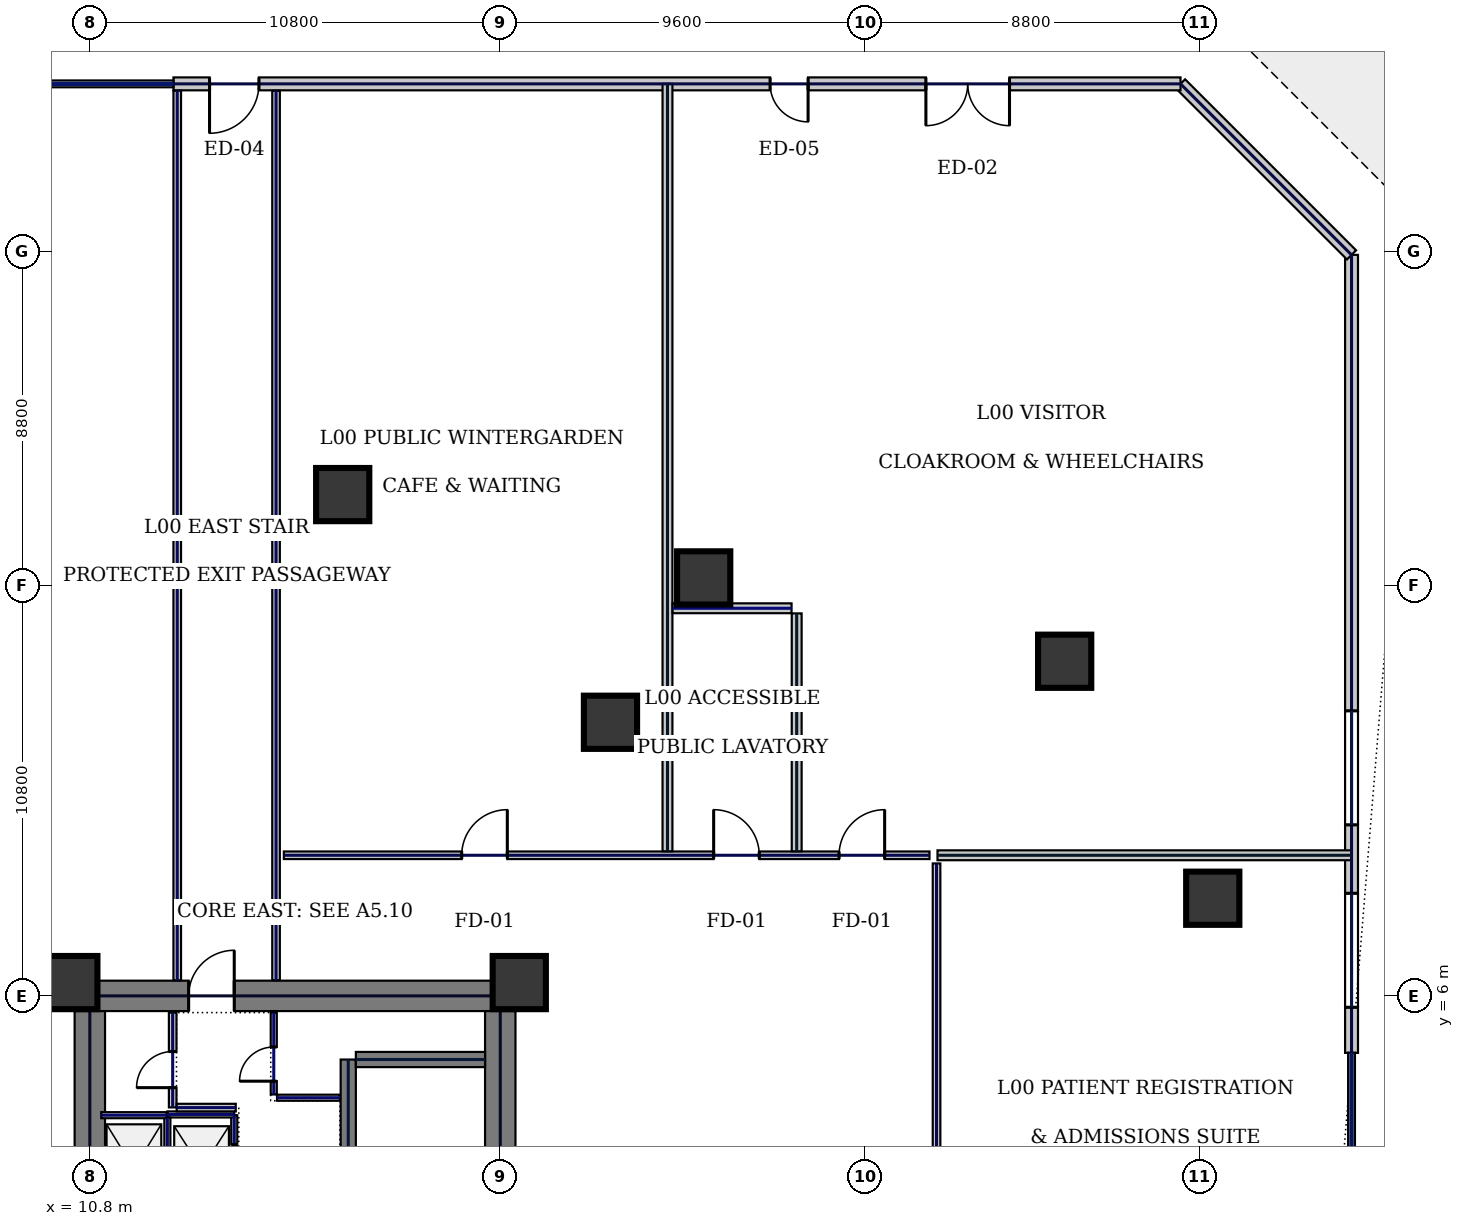
"""IFC4 building model, lengths in metres.
Left out: names, types, materials, properties, quantities, classifications, styles, units other than length and angle.
Written with IfcOpenShell. Run it as: python <this file> out.ifc"""

import sys

from ifc_helpers import new_model, si_unit, direction, frame, frame_2d, origin, origin_2d, place, context, subcontext, project, spatial, rectangle, hollow_circle, extrude, element, fill, save


model = new_model("IFC4")
c1 = context("Model", 3, precision=1e-05, world=origin(), true_north=direction((0.0, 1.0)))
c2 = subcontext(c1, "Body", "Model", "MODEL_VIEW")
j1 = project(units=[si_unit("LENGTHUNIT", "METRE"), si_unit("PLANEANGLEUNIT", "RADIAN")], contexts=[c1])
p1 = place(None, origin())
s1 = spatial("IfcSite", under=j1, at=p1, CompositionType="ELEMENT")
p2 = place(p1, origin())
s2 = spatial("IfcBuilding", under=s1, at=p2, CompositionType="ELEMENT")
p3 = place(p2, origin())
s3 = spatial("IfcBuildingStorey", under=s2, at=p3, CompositionType="ELEMENT", Elevation=0.0)
p4 = place(p3, frame((10.4, 6.0, 0.0), z_axis=(0.0, 0.0, 1.0), x_axis=(1.0, 0.0, 0.0)))
e1 = element("IfcWall", 1, at=p4, inside=s3, PredefinedType="SHEAR", context=c2, shape_type="SweptSolid", body=[
    extrude(rectangle(XDim=11.6, YDim=0.8, at=frame_2d((5.8, 0.0))), origin(), (0.0, 0.0, 1.0), 8.1),
])
p5 = place(p4, frame((3.0, 0.0, 0.0)))
e2 = element("IfcOpeningElement", 2, at=p5, cuts=e1, PredefinedType="OPENING", context=c2, shape_type="SweptSolid", body=[
    extrude(rectangle(XDim=1.2, YDim=2.2, at=frame_2d((0.6, 1.1))), frame((0.0, 0.41, 0.0), z_axis=(0.0, -1.0, 0.0), x_axis=(1.0, 0.0, 0.0)), (0.0, 0.0, 1.0), 0.82),
])
p6 = place(p3, frame((21.6, -5.6, 0.0), z_axis=(0.0, 0.0, 1.0), x_axis=(0.0, 1.0, 0.0)))
e3 = element("IfcWall", 3, at=p6, inside=s3, PredefinedType="SHEAR", context=c2, shape_type="SweptSolid", body=[
    extrude(rectangle(XDim=11.2, YDim=0.8, at=frame_2d((5.6, 0.0))), origin(), (0.0, 0.0, 1.0), 8.1),
])
p7 = place(p3, frame((10.8, 0.05, 0.0), z_axis=(0.0, 0.0, 1.0), x_axis=(0.0, 1.0, 0.0)))
e4 = element("IfcWall", 4, at=p7, inside=s3, PredefinedType="SHEAR", context=c2, shape_type="SweptSolid", body=[
    extrude(rectangle(XDim=5.55, YDim=0.8, at=frame_2d((2.775, 0.0))), origin(), (0.0, 0.0, 1.0), 8.1),
])
p8 = place(p3, frame((17.6, -4.325, 0.0), z_axis=(0.0, 0.0, 1.0), x_axis=(0.0, 1.0, 0.0)))
e5 = element("IfcWall", 5, at=p8, inside=s3, PredefinedType="SHEAR", context=c2, shape_type="SweptSolid", body=[
    extrude(rectangle(XDim=8.65, YDim=0.4, at=frame_2d((4.325, 0.0))), origin(), (0.0, 0.0, 1.0), 8.1),
])
p9 = place(p8, frame((0.25, 0.0, 0.0)))
e6 = element("IfcOpeningElement", 6, at=p9, cuts=e5, PredefinedType="OPENING", context=c2, shape_type="SweptSolid", body=[
    extrude(rectangle(XDim=1.1, YDim=2.2, at=frame_2d((0.55, 1.1))), frame((0.0, 0.21, 0.0), z_axis=(0.0, -1.0, 0.0), x_axis=(1.0, 0.0, 0.0)), (0.0, 0.0, 1.0), 0.42),
])
p10 = place(p3, frame((17.8, 4.325, 0.0), z_axis=(0.0, 0.0, 1.0), x_axis=(1.0, 0.0, 0.0)))
e7 = element("IfcWall", 7, at=p10, inside=s3, PredefinedType="SHEAR", context=c2, shape_type="SweptSolid", body=[
    extrude(rectangle(XDim=3.4, YDim=0.4, at=frame_2d((1.7, 0.0))), origin(), (0.0, 0.0, 1.0), 8.1),
])
for number, where, z_axis, x_axis in (
    (8, (10.3, 6.35, 0.0), (0.0, 0.0, 1.0), (1.0, 0.0, 0.0)),
    (9, (22.1, 6.35, 0.0), (0.0, 0.0, 1.0), (1.0, 0.0, 0.0)),
    (10, (24.5, 13.2, 0.0), (0.0, 0.0, 1.0), (1.0, 0.0, 0.0)),
    (11, (36.451, 14.806, 0.0), (0.0, 0.0, 1.0), (1.0, 0.0, 0.0)),
    (12, (26.952, 16.999, 0.0), (0.0, 0.0, 1.0), (1.0, 0.0, 0.0)),
    (13, (17.454, 19.192, 0.0), (0.0, 0.0, 1.0), (1.0, 0.0, 0.0)),
    (14, (40.348, 8.57, 0.0), (0.0, 0.0, 1.0), (1.0, 0.0, 0.0)),
):
    element("IfcColumn", number, at=place(p3, frame(where, z_axis=z_axis, x_axis=x_axis)), inside=s3, PredefinedType="COLUMN", context=c2, shape_type="SweptSolid", body=[
        extrude(hollow_circle(Radius=0.7, WallThickness=0.05, at=origin_2d()), origin(), (0.0, 0.0, 1.0), 8.1),
    ])
p11 = place(p3, frame((44.0, 4.5, 0.0), z_axis=(0.0, 0.0, 1.0), x_axis=(0.0, 1.0, 0.0)))
e15 = element("IfcWall", 15, at=p11, inside=s3, PredefinedType="STANDARD", context=c2, shape_type="SweptSolid", body=[
    extrude(rectangle(XDim=21.0, YDim=0.34, at=frame_2d((10.5, 0.0))), origin(), (0.0, 0.0, 1.0), 8.1),
])
p12 = place(p11, frame((1.2, 0.0, 1.2)))
e16 = element("IfcOpeningElement", 16, at=p12, cuts=e15, PredefinedType="OPENING", context=c2, shape_type="SweptSolid", body=[
    extrude(rectangle(XDim=3.0, YDim=1.8, at=frame_2d((1.5, 0.9))), frame((0.0, 0.18, 0.0), z_axis=(0.0, -1.0, 0.0), x_axis=(1.0, 0.0, 0.0)), (0.0, 0.0, 1.0), 0.36),
])
p13 = place(p11, frame((6.0, 0.0, 1.2)))
e17 = element("IfcOpeningElement", 17, at=p13, cuts=e15, PredefinedType="OPENING", context=c2, shape_type="SweptSolid", body=[
    extrude(rectangle(XDim=3.0, YDim=1.8, at=frame_2d((1.5, 0.9))), frame((0.0, 0.18, 0.0), z_axis=(0.0, -1.0, 0.0), x_axis=(1.0, 0.0, 0.0)), (0.0, 0.0, 1.0), 0.36),
])
p14 = place(p3, frame((44.0, 25.5, 0.0), z_axis=(0.0, 0.0, 1.0), x_axis=(-0.707106781187, 0.707106781187, 0.0)))
e18 = element("IfcWall", 18, at=p14, inside=s3, PredefinedType="STANDARD", context=c2, shape_type="SweptSolid", body=[
    extrude(rectangle(XDim=6.364, YDim=0.34, at=frame_2d((3.182, 0.0))), origin(), (0.0, 0.0, 1.0), 8.1),
])
p15 = place(p3, frame((39.5, 30.0, 0.0), z_axis=(0.0, 0.0, 1.0), x_axis=(-1.0, 0.0, 0.0)))
e19 = element("IfcWall", 19, at=p15, inside=s3, PredefinedType="STANDARD", context=c2, shape_type="SweptSolid", body=[
    extrude(rectangle(XDim=26.5, YDim=0.34, at=frame_2d((13.25, 0.0))), origin(), (0.0, 0.0, 1.0), 8.1),
])
p16 = place(p15, frame((9.8, 0.0, 0.0)))
e20 = element("IfcOpeningElement", 20, at=p16, cuts=e19, PredefinedType="OPENING", context=c2, shape_type="SweptSolid", body=[
    extrude(rectangle(XDim=1.0, YDim=2.15, at=frame_2d((0.5, 1.075))), frame((0.0, 0.18, 0.0), z_axis=(0.0, -1.0, 0.0), x_axis=(1.0, 0.0, 0.0)), (0.0, 0.0, 1.0), 0.36),
])
p17 = place(p15, frame((4.5, 0.0, 0.0)))
e21 = element("IfcOpeningElement", 21, at=p17, cuts=e19, PredefinedType="OPENING", context=c2, shape_type="SweptSolid", body=[
    extrude(rectangle(XDim=2.2, YDim=2.5, at=frame_2d((1.1, 1.25))), frame((0.0, 0.18, 0.0), z_axis=(0.0, -1.0, 0.0), x_axis=(1.0, 0.0, 0.0)), (0.0, 0.0, 1.0), 0.36),
])
p18 = place(p15, frame((24.25, 0.0, 0.0)))
e22 = element("IfcOpeningElement", 22, at=p18, cuts=e19, PredefinedType="OPENING", context=c2, shape_type="SweptSolid", body=[
    extrude(rectangle(XDim=1.3, YDim=2.2, at=frame_2d((0.65, 1.1))), frame((0.0, 0.18, 0.0), z_axis=(0.0, -1.0, 0.0), x_axis=(1.0, 0.0, 0.0)), (0.0, 0.0, 1.0), 0.36),
])
p19 = place(p3, frame((14.6, 0.12, 0.0), z_axis=(0.0, 0.0, 1.0), x_axis=(0.0, 1.0, 0.0)))
e23 = element("IfcWall", 23, at=p19, inside=s3, PredefinedType="PARTITIONING", context=c2, shape_type="SweptSolid", body=[
    extrude(rectangle(XDim=2.74, YDim=0.16, at=frame_2d((1.37, 0.0))), origin(), (0.0, 0.0, 1.0), 8.1),
])
p20 = place(p19, frame((0.77, 0.0, 0.0)))
e24 = element("IfcOpeningElement", 24, at=p20, cuts=e23, PredefinedType="OPENING", context=c2, shape_type="SweptSolid", body=[
    extrude(rectangle(XDim=1.2, YDim=2.2, at=frame_2d((0.6, 1.1))), frame((0.0, 0.09, 0.0), z_axis=(0.0, -1.0, 0.0), x_axis=(1.0, 0.0, 0.0)), (0.0, 0.0, 1.0), 0.18),
])
p21 = place(p3, frame((12.84, 2.88, 0.0), z_axis=(0.0, 0.0, 1.0), x_axis=(1.0, 0.0, 0.0)))
e25 = element("IfcWall", 25, at=p21, inside=s3, PredefinedType="PARTITIONING", context=c2, shape_type="SweptSolid", body=[
    extrude(rectangle(XDim=1.76, YDim=0.16, at=frame_2d((0.88, 0.0))), origin(), (0.0, 0.0, 1.0), 8.1),
])
p22 = place(p3, frame((12.84, 0.18, 0.0), z_axis=(0.0, 0.0, 1.0), x_axis=(0.0, 1.0, 0.0)))
e26 = element("IfcWall", 26, at=p22, inside=s3, PredefinedType="PARTITIONING", context=c2, shape_type="SweptSolid", body=[
    extrude(rectangle(XDim=2.62, YDim=0.16, at=frame_2d((1.31, 0.0))), origin(), (0.0, 0.0, 1.0), 8.1),
])
p23 = place(p3, frame((11.1, 2.86, 0.0), z_axis=(0.0, 0.0, 1.0), x_axis=(1.0, 0.0, 0.0)))
e27 = element("IfcWall", 27, at=p23, inside=s3, PredefinedType="PARTITIONING", context=c2, shape_type="SweptSolid", body=[
    extrude(rectangle(XDim=1.72, YDim=0.16, at=frame_2d((0.86, 0.0))), origin(), (0.0, 0.0, 1.0), 8.1),
])
p24 = place(p3, frame((15.64, 3.405, 0.0), z_axis=(0.0, 0.0, 1.0), x_axis=(0.0, 1.0, 0.0)))
e28 = element("IfcWall", 28, at=p24, inside=s3, PredefinedType="PARTITIONING", context=c2, shape_type="SweptSolid", body=[
    extrude(rectangle(XDim=2.155, YDim=0.16, at=frame_2d((1.078, 0.0))), origin(), (0.0, 0.0, 1.0), 8.1),
])
p25 = place(p24, frame((0.35, 0.0, 0.0)))
e29 = element("IfcOpeningElement", 29, at=p25, cuts=e28, PredefinedType="OPENING", context=c2, shape_type="SweptSolid", body=[
    extrude(rectangle(XDim=0.9, YDim=2.2, at=frame_2d((0.45, 1.1))), frame((0.0, 0.09, 0.0), z_axis=(0.0, -1.0, 0.0), x_axis=(1.0, 0.0, 0.0)), (0.0, 0.0, 1.0), 0.18),
])
p26 = place(p3, frame((15.725, 3.32, 0.0), z_axis=(0.0, 0.0, 1.0), x_axis=(1.0, 0.0, 0.0)))
e30 = element("IfcWall", 30, at=p26, inside=s3, PredefinedType="PARTITIONING", context=c2, shape_type="SweptSolid", body=[
    extrude(rectangle(XDim=1.655, YDim=0.16, at=frame_2d((0.827, 0.0))), origin(), (0.0, 0.0, 1.0), 8.1),
])
p27 = place(p3, frame((12.98, 3.065, 0.0), z_axis=(0.0, 0.0, 1.0), x_axis=(0.0, 1.0, 0.0)))
e31 = element("IfcWall", 31, at=p27, inside=s3, PredefinedType="SOLIDWALL", context=c2, shape_type="SweptSolid", body=[
    extrude(rectangle(XDim=2.495, YDim=0.2, at=frame_2d((1.248, 0.0))), origin(), (0.0, 0.0, 1.0), 8.1),
])
p28 = place(p27, frame((0.52, 0.0, 0.0)))
e32 = element("IfcOpeningElement", 32, at=p28, cuts=e31, PredefinedType="OPENING", context=c2, shape_type="SweptSolid", body=[
    extrude(rectangle(XDim=0.95, YDim=2.2, at=frame_2d((0.475, 1.1))), frame((0.0, 0.11, 0.0), z_axis=(0.0, -1.0, 0.0), x_axis=(1.0, 0.0, 0.0)), (0.0, 0.0, 1.0), 0.22),
])
p29 = place(p3, frame((13.085, 3.06, 0.0), z_axis=(0.0, 0.0, 1.0), x_axis=(1.0, 0.0, 0.0)))
e33 = element("IfcWall", 33, at=p29, inside=s3, PredefinedType="SOLIDWALL", context=c2, shape_type="SweptSolid", body=[
    extrude(rectangle(XDim=1.555, YDim=0.2, at=frame_2d((0.777, 0.0))), origin(), (0.0, 0.0, 1.0), 8.1),
])
for number, where, z_axis, x_axis in (
    (34, (13.1, 6.41, 0.0), (0.0, 0.0, 1.0), (0.0, 1.0, 0.0)),
    (35, (15.7, 6.41, 0.0), (0.0, 0.0, 1.0), (0.0, 1.0, 0.0)),
):
    element("IfcWall", number, at=place(p3, frame(where, z_axis=z_axis, x_axis=x_axis)), inside=s3, PredefinedType="SOLIDWALL", context=c2, shape_type="SweptSolid", body=[
        extrude(rectangle(XDim=23.41, YDim=0.2, at=frame_2d((11.705, 0.0))), origin(), (0.0, 0.0, 1.0), 8.1),
    ])
p30 = place(p3, frame((15.905, 9.7, 0.0), z_axis=(0.0, 0.0, 1.0), x_axis=(1.0, 0.0, 0.0)))
e36 = element("IfcWall", 36, at=p30, inside=s3, PredefinedType="SOLIDWALL", context=c2, shape_type="SweptSolid", body=[
    extrude(rectangle(XDim=16.99, YDim=0.2, at=frame_2d((8.495, 0.0))), origin(), (0.0, 0.0, 1.0), 8.1),
])
p31 = place(p30, frame((4.681, 0.0, 0.0)))
e37 = element("IfcOpeningElement", 37, at=p31, cuts=e36, PredefinedType="OPENING", context=c2, shape_type="SweptSolid", body=[
    extrude(rectangle(XDim=1.2, YDim=2.2, at=frame_2d((0.6, 1.1))), frame((0.0, 0.11, 0.0), z_axis=(0.0, -1.0, 0.0), x_axis=(1.0, 0.0, 0.0)), (0.0, 0.0, 1.0), 0.22),
])
p32 = place(p30, frame((11.31, 0.0, 0.0)))
e38 = element("IfcOpeningElement", 38, at=p32, cuts=e36, PredefinedType="OPENING", context=c2, shape_type="SweptSolid", body=[
    extrude(rectangle(XDim=1.2, YDim=2.2, at=frame_2d((0.6, 1.1))), frame((0.0, 0.11, 0.0), z_axis=(0.0, -1.0, 0.0), x_axis=(1.0, 0.0, 0.0)), (0.0, 0.0, 1.0), 0.22),
])
p33 = place(p30, frame((14.609, 0.0, 0.0)))
e39 = element("IfcOpeningElement", 39, at=p33, cuts=e36, PredefinedType="OPENING", context=c2, shape_type="SweptSolid", body=[
    extrude(rectangle(XDim=1.2, YDim=2.2, at=frame_2d((0.6, 1.1))), frame((0.0, 0.11, 0.0), z_axis=(0.0, -1.0, 0.0), x_axis=(1.0, 0.0, 0.0)), (0.0, 0.0, 1.0), 0.22),
])
p34 = place(p3, frame((33.08, 9.485, 0.0), z_axis=(0.0, 0.0, 1.0), x_axis=(0.0, -1.0, 0.0)))
e40 = element("IfcWall", 40, at=p34, inside=s3, PredefinedType="SOLIDWALL", context=c2, shape_type="SweptSolid", body=[
    extrude(rectangle(XDim=18.97, YDim=0.2, at=frame_2d((9.485, 0.0))), origin(), (0.0, 0.0, 1.0), 8.1),
])
p35 = place(p34, frame((9.02, 0.0, 0.0)))
e41 = element("IfcOpeningElement", 41, at=p35, cuts=e40, PredefinedType="OPENING", context=c2, shape_type="SweptSolid", body=[
    extrude(rectangle(XDim=1.2, YDim=2.2, at=frame_2d((0.6, 1.1))), frame((0.0, 0.11, 0.0), z_axis=(0.0, -1.0, 0.0), x_axis=(1.0, 0.0, 0.0)), (0.0, 0.0, 1.0), 0.22),
])
p36 = place(p3, frame((33.105, 9.7, 0.0), z_axis=(0.0, 0.0, 1.0), x_axis=(1.0, 0.0, 0.0)))
e42 = element("IfcWall", 42, at=p36, inside=s3, PredefinedType="SOLIDWALL", context=c2, shape_type="SweptSolid", body=[
    extrude(rectangle(XDim=10.895, YDim=0.26, at=frame_2d((5.448, 0.0))), origin(), (0.0, 0.0, 1.0), 8.1),
])
p37 = place(p3, frame((26.0, 9.805, 0.0), z_axis=(0.0, 0.0, 1.0), x_axis=(0.0, 1.0, 0.0)))
e43 = element("IfcWall", 43, at=p37, inside=s3, PredefinedType="SOLIDWALL", context=c2, shape_type="SweptSolid", body=[
    extrude(rectangle(XDim=20.195, YDim=0.26, at=frame_2d((10.098, 0.0))), origin(), (0.0, 0.0, 1.0), 8.1),
])
p38 = place(p3, frame((29.4, 9.805, 0.0), z_axis=(0.0, 0.0, 1.0), x_axis=(0.0, 1.0, 0.0)))
e44 = element("IfcWall", 44, at=p38, inside=s3, PredefinedType="SOLIDWALL", context=c2, shape_type="SweptSolid", body=[
    extrude(rectangle(XDim=6.26, YDim=0.26, at=frame_2d((3.13, 0.0))), origin(), (0.0, 0.0, 1.0), 8.1),
])
p39 = place(p3, frame((26.135, 16.2, 0.0), z_axis=(0.0, 0.0, 1.0), x_axis=(1.0, 0.0, 0.0)))
e45 = element("IfcWall", 45, at=p39, inside=s3, PredefinedType="SOLIDWALL", context=c2, shape_type="SweptSolid", body=[
    extrude(rectangle(XDim=3.13, YDim=0.26, at=frame_2d((1.565, 0.0))), origin(), (0.0, 0.0, 1.0), 7.095),
])
p40 = place(p12, origin())
e46 = element("IfcWindow", 46, at=p40, inside=s3, PartitioningType="SINGLE_PANEL", PredefinedType="WINDOW", context=c2, shape_type="SweptSolid", body=[
    extrude(rectangle(XDim=3.0, YDim=1.8, at=frame_2d((1.5, 0.9))), frame((0.0, 0.03, 0.0), z_axis=(0.0, -1.0, 0.0), x_axis=(1.0, 0.0, 0.0)), (0.0, 0.0, 1.0), 0.06),
])
fill(e16, e46)
p41 = place(p13, origin())
e47 = element("IfcWindow", 47, at=p41, inside=s3, PartitioningType="SINGLE_PANEL", PredefinedType="WINDOW", context=c2, shape_type="SweptSolid", body=[
    extrude(rectangle(XDim=3.0, YDim=1.8, at=frame_2d((1.5, 0.9))), frame((0.0, 0.03, 0.0), z_axis=(0.0, -1.0, 0.0), x_axis=(1.0, 0.0, 0.0)), (0.0, 0.0, 1.0), 0.06),
])
fill(e17, e47)
p42 = place(p16, origin())
e48 = element("IfcDoor", 48, at=p42, inside=s3, OperationType="SINGLE_SWING_LEFT", PredefinedType="DOOR", context=c2, shape_type="SweptSolid", body=[
    extrude(rectangle(XDim=1.0, YDim=2.15, at=frame_2d((0.5, 1.075))), frame((0.0, 0.025, 0.0), z_axis=(0.0, -1.0, 0.0), x_axis=(1.0, 0.0, 0.0)), (0.0, 0.0, 1.0), 0.05),
])
fill(e20, e48)
p43 = place(p17, origin())
e49 = element("IfcDoor", 49, at=p43, inside=s3, OperationType="DOUBLE_SWING_LEFT", PredefinedType="DOOR", context=c2, shape_type="SweptSolid", body=[
    extrude(rectangle(XDim=2.2, YDim=2.5, at=frame_2d((1.1, 1.25))), frame((0.0, 0.025, 0.0), z_axis=(0.0, -1.0, 0.0), x_axis=(1.0, 0.0, 0.0)), (0.0, 0.0, 1.0), 0.05),
])
fill(e21, e49)
p44 = place(p18, origin())
e50 = element("IfcDoor", 50, at=p44, inside=s3, OperationType="SINGLE_SWING_RIGHT", PredefinedType="DOOR", context=c2, shape_type="SweptSolid", body=[
    extrude(rectangle(XDim=1.3, YDim=2.2, at=frame_2d((0.65, 1.1))), frame((0.0, 0.025, 0.0), z_axis=(0.0, -1.0, 0.0), x_axis=(1.0, 0.0, 0.0)), (0.0, 0.0, 1.0), 0.05),
])
fill(e22, e50)
p45 = place(p5, origin())
e51 = element("IfcDoor", 51, at=p45, inside=s3, OperationType="SINGLE_SWING_RIGHT", PredefinedType="DOOR", context=c2, shape_type="SweptSolid", body=[
    extrude(rectangle(XDim=1.2, YDim=2.2, at=frame_2d((0.6, 1.1))), frame((0.0, 0.025, 0.0), z_axis=(0.0, -1.0, 0.0), x_axis=(1.0, 0.0, 0.0)), (0.0, 0.0, 1.0), 0.05),
])
fill(e2, e51)
p46 = place(p20, origin())
e52 = element("IfcDoor", 52, at=p46, inside=s3, OperationType="SLIDING_TO_LEFT", PredefinedType="DOOR", context=c2, shape_type="SweptSolid", body=[
    extrude(rectangle(XDim=1.2, YDim=2.2, at=frame_2d((0.6, 1.1))), frame((0.0, 0.025, 0.0), z_axis=(0.0, -1.0, 0.0), x_axis=(1.0, 0.0, 0.0)), (0.0, 0.0, 1.0), 0.05),
])
fill(e24, e52)
p47 = place(p25, origin())
e53 = element("IfcDoor", 53, at=p47, inside=s3, OperationType="SINGLE_SWING_LEFT", PredefinedType="DOOR", context=c2, shape_type="SweptSolid", body=[
    extrude(rectangle(XDim=0.9, YDim=2.2, at=frame_2d((0.45, 1.1))), frame((0.0, 0.025, 0.0), z_axis=(0.0, -1.0, 0.0), x_axis=(1.0, 0.0, 0.0)), (0.0, 0.0, 1.0), 0.05),
])
fill(e29, e53)
p48 = place(p28, origin())
e54 = element("IfcDoor", 54, at=p48, inside=s3, OperationType="SINGLE_SWING_LEFT", PredefinedType="DOOR", context=c2, shape_type="SweptSolid", body=[
    extrude(rectangle(XDim=0.95, YDim=2.2, at=frame_2d((0.475, 1.1))), frame((0.0, 0.025, 0.0), z_axis=(0.0, -1.0, 0.0), x_axis=(1.0, 0.0, 0.0)), (0.0, 0.0, 1.0), 0.05),
])
fill(e32, e54)
p49 = place(p31, origin())
e55 = element("IfcDoor", 55, at=p49, inside=s3, OperationType="SINGLE_SWING_RIGHT", PredefinedType="DOOR", context=c2, shape_type="SweptSolid", body=[
    extrude(rectangle(XDim=1.2, YDim=2.2, at=frame_2d((0.6, 1.1))), frame((0.0, 0.025, 0.0), z_axis=(0.0, -1.0, 0.0), x_axis=(1.0, 0.0, 0.0)), (0.0, 0.0, 1.0), 0.05),
])
fill(e37, e55)
p50 = place(p32, origin())
e56 = element("IfcDoor", 56, at=p50, inside=s3, OperationType="SINGLE_SWING_LEFT", PredefinedType="DOOR", context=c2, shape_type="SweptSolid", body=[
    extrude(rectangle(XDim=1.2, YDim=2.2, at=frame_2d((0.6, 1.1))), frame((0.0, 0.025, 0.0), z_axis=(0.0, -1.0, 0.0), x_axis=(1.0, 0.0, 0.0)), (0.0, 0.0, 1.0), 0.05),
])
fill(e38, e56)
p51 = place(p33, origin())
e57 = element("IfcDoor", 57, at=p51, inside=s3, OperationType="SINGLE_SWING_RIGHT", PredefinedType="DOOR", context=c2, shape_type="SweptSolid", body=[
    extrude(rectangle(XDim=1.2, YDim=2.2, at=frame_2d((0.6, 1.1))), frame((0.0, 0.025, 0.0), z_axis=(0.0, -1.0, 0.0), x_axis=(1.0, 0.0, 0.0)), (0.0, 0.0, 1.0), 0.05),
])
fill(e39, e57)
save(model, sys.argv[1])
